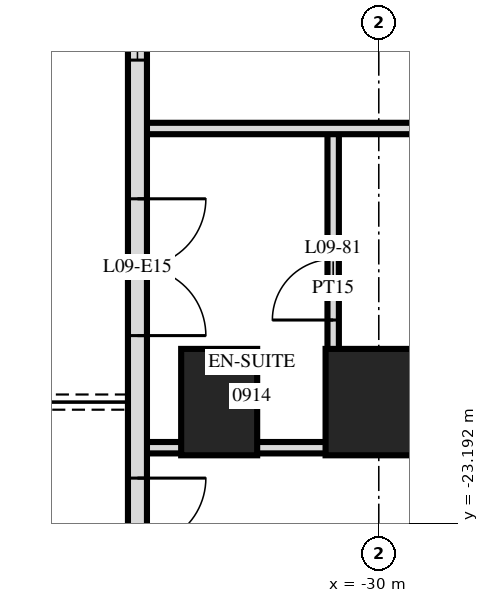
"""IFC4 building model, lengths in metres.
Left out: names, types, materials, properties, quantities, classifications, styles, units other than length and angle.
Written with IfcOpenShell. Run it as: python <this file> out.ifc"""

import sys

from ifc_helpers import new_model, si_unit, direction, frame, frame_2d, origin, origin_2d, place, context, subcontext, project, spatial, rectangle, extrude, element, fill, save


model = new_model("IFC4")
c1 = context("Model", 3, precision=1e-05, world=origin(), true_north=direction((0.0, 1.0)))
c2 = subcontext(c1, "Body", "Model", "MODEL_VIEW")
j1 = project(units=[si_unit("LENGTHUNIT", "METRE"), si_unit("PLANEANGLEUNIT", "RADIAN")], contexts=[c1])
p1 = place(None, origin())
s1 = spatial("IfcSite", under=j1, at=p1, CompositionType="ELEMENT")
p2 = place(p1, origin())
s2 = spatial("IfcBuilding", under=s1, at=p2, CompositionType="ELEMENT")
p3 = place(p2, frame((0.0, 0.0, 42.0)))
s3 = spatial("IfcBuildingStorey", under=s2, at=p3, CompositionType="ELEMENT", Elevation=42.0)
p4 = place(p3, frame((-32.1, -21.6, 0.0), z_axis=(0.0, 0.0, 1.0), x_axis=(0.0, 1.0, 0.0)))
e1 = element("IfcColumn", 1, at=p4, inside=s3, PredefinedType="COLUMN", context=c2, shape_type="SweptSolid", body=[
    extrude(rectangle(XDim=1.4, YDim=1.0, at=origin_2d()), origin(), (0.0, 0.0, 1.0), 3.6),
])
p5 = place(p3, frame((-30.0, -21.6, 0.0), z_axis=(0.0, 0.0, 1.0), x_axis=(1.0, 0.0, 0.0)))
e2 = element("IfcColumn", 2, at=p5, inside=s3, PredefinedType="COLUMN", context=c2, shape_type="SweptSolid", body=[
    extrude(rectangle(XDim=1.4, YDim=1.4, at=origin_2d()), origin(), (0.0, 0.0, 1.0), 3.6),
])
p6 = place(p3, frame((-33.175, -3.325, 0.0), z_axis=(0.0, 0.0, 1.0), x_axis=(0.0, -1.0, 0.0)))
e3 = element("IfcWall", 3, at=p6, inside=s3, PredefinedType="SOLIDWALL", context=c2, shape_type="SweptSolid", body=[
    extrude(rectangle(XDim=21.551, YDim=0.25, at=frame_2d((10.775, 0.0))), origin(), (0.0, 0.0, 1.0), 3.32),
])
p7 = place(p6, frame((6.575, 0.0, 0.0)))
e4 = element("IfcOpeningElement", 4, at=p7, cuts=e3, PredefinedType="OPENING", context=c2, shape_type="SweptSolid", body=[
    extrude(rectangle(XDim=1.8, YDim=2.4, at=frame_2d((0.9, 1.2))), frame((0.0, 0.135, 0.0), z_axis=(0.0, -1.0, 0.0), x_axis=(1.0, 0.0, 0.0)), (0.0, 0.0, 1.0), 0.27),
])
p8 = place(p6, frame((9.425, 0.0, 0.3)))
e5 = element("IfcOpeningElement", 5, at=p8, cuts=e3, PredefinedType="OPENING", context=c2, shape_type="SweptSolid", body=[
    extrude(rectangle(XDim=1.8, YDim=2.1, at=frame_2d((0.9, 1.05))), frame((0.0, 0.135, 0.0), z_axis=(0.0, -1.0, 0.0), x_axis=(1.0, 0.0, 0.0)), (0.0, 0.0, 1.0), 0.27),
])
p9 = place(p6, frame((12.575, 0.0, 0.3)))
e6 = element("IfcOpeningElement", 6, at=p9, cuts=e3, PredefinedType="OPENING", context=c2, shape_type="SweptSolid", body=[
    extrude(rectangle(XDim=1.2, YDim=2.1, at=frame_2d((0.6, 1.05))), frame((0.0, 0.135, 0.0), z_axis=(0.0, -1.0, 0.0), x_axis=(1.0, 0.0, 0.0)), (0.0, 0.0, 1.0), 0.27),
])
p10 = place(p6, frame((15.6, 0.0, 0.0)))
e7 = element("IfcOpeningElement", 7, at=p10, cuts=e3, PredefinedType="OPENING", context=c2, shape_type="SweptSolid", body=[
    extrude(rectangle(XDim=1.8, YDim=2.4, at=frame_2d((0.9, 1.2))), frame((0.0, 0.135, 0.0), z_axis=(0.0, -1.0, 0.0), x_axis=(1.0, 0.0, 0.0)), (0.0, 0.0, 1.0), 0.27),
])
p11 = place(p6, frame((19.275, 0.0, 0.0)))
e8 = element("IfcOpeningElement", 8, at=p11, cuts=e3, PredefinedType="OPENING", context=c2, shape_type="SweptSolid", body=[
    extrude(rectangle(XDim=1.8, YDim=2.4, at=frame_2d((0.9, 1.2))), frame((0.0, 0.135, 0.0), z_axis=(0.0, -1.0, 0.0), x_axis=(1.0, 0.0, 0.0)), (0.0, 0.0, 1.0), 0.27),
])
p12 = place(p3, frame((-30.6, -22.2, 0.0), z_axis=(0.0, 0.0, 1.0), x_axis=(0.0, 1.0, 0.0)))
e9 = element("IfcWall", 9, at=p12, inside=s3, PredefinedType="PARTITIONING", context=c2, shape_type="SweptSolid", body=[
    extrude(rectangle(XDim=4.2, YDim=0.15, at=frame_2d((2.1, 0.0))), origin(), (0.0, 0.0, 1.0), 3.32),
])
p13 = place(p12, frame((1.68, 0.0, 0.0)))
e10 = element("IfcOpeningElement", 10, at=p13, cuts=e9, PredefinedType="OPENING", context=c2, shape_type="SweptSolid", body=[
    extrude(rectangle(XDim=0.8, YDim=2.1, at=frame_2d((0.4, 1.05))), frame((0.0, 0.085, 0.0), z_axis=(0.0, -1.0, 0.0), x_axis=(1.0, 0.0, 0.0)), (0.0, 0.0, 1.0), 0.17),
])
p14 = place(p3, frame((-33.12, -22.2, 0.0), z_axis=(0.0, 0.0, 1.0), x_axis=(1.0, 0.0, 0.0)))
e11 = element("IfcWall", 11, at=p14, inside=s3, PredefinedType="PARTITIONING", context=c2, shape_type="SweptSolid", body=[
    extrude(rectangle(XDim=2.52, YDim=0.15, at=frame_2d((1.26, 0.0))), origin(), (0.0, 0.0, 1.0), 3.32),
])
p15 = place(p3, frame((-33.12, -18.0, 0.0), z_axis=(0.0, 0.0, 1.0), x_axis=(1.0, 0.0, 0.0)))
e12 = element("IfcWall", 12, at=p15, inside=s3, PredefinedType="PARTITIONING", context=c2, shape_type="SweptSolid", body=[
    extrude(rectangle(XDim=66.24, YDim=0.15, at=frame_2d((33.12, 0.0))), origin(), (0.0, 0.0, 1.0), 3.32),
])
p16 = place(p15, frame((12.27, 0.0, 0.0)))
e13 = element("IfcOpeningElement", 13, at=p16, cuts=e12, PredefinedType="OPENING", context=c2, shape_type="SweptSolid", body=[
    extrude(rectangle(XDim=1.0, YDim=2.1, at=frame_2d((0.5, 1.05))), frame((0.0, 0.085, 0.0), z_axis=(0.0, -1.0, 0.0), x_axis=(1.0, 0.0, 0.0)), (0.0, 0.0, 1.0), 0.17),
])
p17 = place(p15, frame((16.97, 0.0, 0.0)))
e14 = element("IfcOpeningElement", 14, at=p17, cuts=e12, PredefinedType="OPENING", context=c2, shape_type="SweptSolid", body=[
    extrude(rectangle(XDim=1.0, YDim=2.1, at=frame_2d((0.5, 1.05))), frame((0.0, 0.085, 0.0), z_axis=(0.0, -1.0, 0.0), x_axis=(1.0, 0.0, 0.0)), (0.0, 0.0, 1.0), 0.17),
])
p18 = place(p15, frame((18.27, 0.0, 0.0)))
e15 = element("IfcOpeningElement", 15, at=p18, cuts=e12, PredefinedType="OPENING", context=c2, shape_type="SweptSolid", body=[
    extrude(rectangle(XDim=1.0, YDim=2.1, at=frame_2d((0.5, 1.05))), frame((0.0, 0.085, 0.0), z_axis=(0.0, -1.0, 0.0), x_axis=(1.0, 0.0, 0.0)), (0.0, 0.0, 1.0), 0.17),
])
p19 = place(p15, frame((22.97, 0.0, 0.0)))
e16 = element("IfcOpeningElement", 16, at=p19, cuts=e12, PredefinedType="OPENING", context=c2, shape_type="SweptSolid", body=[
    extrude(rectangle(XDim=1.0, YDim=2.1, at=frame_2d((0.5, 1.05))), frame((0.0, 0.085, 0.0), z_axis=(0.0, -1.0, 0.0), x_axis=(1.0, 0.0, 0.0)), (0.0, 0.0, 1.0), 0.17),
])
p20 = place(p15, frame((24.27, 0.0, 0.0)))
e17 = element("IfcOpeningElement", 17, at=p20, cuts=e12, PredefinedType="OPENING", context=c2, shape_type="SweptSolid", body=[
    extrude(rectangle(XDim=1.0, YDim=2.1, at=frame_2d((0.5, 1.05))), frame((0.0, 0.085, 0.0), z_axis=(0.0, -1.0, 0.0), x_axis=(1.0, 0.0, 0.0)), (0.0, 0.0, 1.0), 0.17),
])
p21 = place(p15, frame((28.97, 0.0, 0.0)))
e18 = element("IfcOpeningElement", 18, at=p21, cuts=e12, PredefinedType="OPENING", context=c2, shape_type="SweptSolid", body=[
    extrude(rectangle(XDim=1.0, YDim=2.1, at=frame_2d((0.5, 1.05))), frame((0.0, 0.085, 0.0), z_axis=(0.0, -1.0, 0.0), x_axis=(1.0, 0.0, 0.0)), (0.0, 0.0, 1.0), 0.17),
])
p22 = place(p15, frame((30.27, 0.0, 0.0)))
e19 = element("IfcOpeningElement", 19, at=p22, cuts=e12, PredefinedType="OPENING", context=c2, shape_type="SweptSolid", body=[
    extrude(rectangle(XDim=1.0, YDim=2.1, at=frame_2d((0.5, 1.05))), frame((0.0, 0.085, 0.0), z_axis=(0.0, -1.0, 0.0), x_axis=(1.0, 0.0, 0.0)), (0.0, 0.0, 1.0), 0.17),
])
p23 = place(p15, frame((34.97, 0.0, 0.0)))
e20 = element("IfcOpeningElement", 20, at=p23, cuts=e12, PredefinedType="OPENING", context=c2, shape_type="SweptSolid", body=[
    extrude(rectangle(XDim=1.0, YDim=2.1, at=frame_2d((0.5, 1.05))), frame((0.0, 0.085, 0.0), z_axis=(0.0, -1.0, 0.0), x_axis=(1.0, 0.0, 0.0)), (0.0, 0.0, 1.0), 0.17),
])
p24 = place(p15, frame((37.27, 0.0, 0.0)))
e21 = element("IfcOpeningElement", 21, at=p24, cuts=e12, PredefinedType="OPENING", context=c2, shape_type="SweptSolid", body=[
    extrude(rectangle(XDim=1.0, YDim=2.1, at=frame_2d((0.5, 1.05))), frame((0.0, 0.085, 0.0), z_axis=(0.0, -1.0, 0.0), x_axis=(1.0, 0.0, 0.0)), (0.0, 0.0, 1.0), 0.17),
])
p25 = place(p15, frame((43.97, 0.0, 0.0)))
e22 = element("IfcOpeningElement", 22, at=p25, cuts=e12, PredefinedType="OPENING", context=c2, shape_type="SweptSolid", body=[
    extrude(rectangle(XDim=1.0, YDim=2.1, at=frame_2d((0.5, 1.05))), frame((0.0, 0.085, 0.0), z_axis=(0.0, -1.0, 0.0), x_axis=(1.0, 0.0, 0.0)), (0.0, 0.0, 1.0), 0.17),
])
p26 = place(p15, frame((45.27, 0.0, 0.0)))
e23 = element("IfcOpeningElement", 23, at=p26, cuts=e12, PredefinedType="OPENING", context=c2, shape_type="SweptSolid", body=[
    extrude(rectangle(XDim=1.0, YDim=2.1, at=frame_2d((0.5, 1.05))), frame((0.0, 0.085, 0.0), z_axis=(0.0, -1.0, 0.0), x_axis=(1.0, 0.0, 0.0)), (0.0, 0.0, 1.0), 0.17),
])
p27 = place(p15, frame((51.22, 0.0, 0.0)))
e24 = element("IfcOpeningElement", 24, at=p27, cuts=e12, PredefinedType="OPENING", context=c2, shape_type="SweptSolid", body=[
    extrude(rectangle(XDim=1.0, YDim=2.1, at=frame_2d((0.5, 1.05))), frame((0.0, 0.085, 0.0), z_axis=(0.0, -1.0, 0.0), x_axis=(1.0, 0.0, 0.0)), (0.0, 0.0, 1.0), 0.17),
])
p28 = place(p15, frame((54.27, 0.0, 0.0)))
e25 = element("IfcOpeningElement", 25, at=p28, cuts=e12, PredefinedType="OPENING", context=c2, shape_type="SweptSolid", body=[
    extrude(rectangle(XDim=1.0, YDim=2.1, at=frame_2d((0.5, 1.05))), frame((0.0, 0.085, 0.0), z_axis=(0.0, -1.0, 0.0), x_axis=(1.0, 0.0, 0.0)), (0.0, 0.0, 1.0), 0.17),
])
p29 = place(p15, frame((6.07, 0.0, 0.0)))
e26 = element("IfcOpeningElement", 26, at=p29, cuts=e12, PredefinedType="OPENING", context=c2, shape_type="SweptSolid", body=[
    extrude(rectangle(XDim=1.0, YDim=2.1, at=frame_2d((0.5, 1.05))), frame((0.0, 0.085, 0.0), z_axis=(0.0, -1.0, 0.0), x_axis=(1.0, 0.0, 0.0)), (0.0, 0.0, 1.0), 0.17),
])
p30 = place(p15, frame((63.37, 0.0, 0.0)))
e27 = element("IfcOpeningElement", 27, at=p30, cuts=e12, PredefinedType="OPENING", context=c2, shape_type="SweptSolid", body=[
    extrude(rectangle(XDim=1.0, YDim=2.1, at=frame_2d((0.5, 1.05))), frame((0.0, 0.085, 0.0), z_axis=(0.0, -1.0, 0.0), x_axis=(1.0, 0.0, 0.0)), (0.0, 0.0, 1.0), 0.17),
])
p31 = place(p9, origin())
e28 = element("IfcWindow", 28, at=p31, inside=s3, PartitioningType="SINGLE_PANEL", PredefinedType="WINDOW", context=c2, shape_type="SweptSolid", body=[
    extrude(rectangle(XDim=1.2, YDim=2.1, at=frame_2d((0.6, 1.05))), frame((0.0, 0.03, 0.0), z_axis=(0.0, -1.0, 0.0), x_axis=(1.0, 0.0, 0.0)), (0.0, 0.0, 1.0), 0.06),
])
fill(e6, e28)
p32 = place(p10, origin())
e29 = element("IfcDoor", 29, at=p32, inside=s3, OperationType="DOUBLE_DOOR_SINGLE_SWING", PredefinedType="DOOR", context=c2, shape_type="SweptSolid", body=[
    extrude(rectangle(XDim=1.8, YDim=2.4, at=frame_2d((0.9, 1.2))), frame((0.0, 0.025, 0.0), z_axis=(0.0, -1.0, 0.0), x_axis=(1.0, 0.0, 0.0)), (0.0, 0.0, 1.0), 0.05),
])
fill(e7, e29)
p33 = place(p11, origin())
e30 = element("IfcDoor", 30, at=p33, inside=s3, OperationType="DOUBLE_DOOR_SINGLE_SWING", PredefinedType="DOOR", context=c2, shape_type="SweptSolid", body=[
    extrude(rectangle(XDim=1.8, YDim=2.4, at=frame_2d((0.9, 1.2))), frame((0.0, 0.025, 0.0), z_axis=(0.0, -1.0, 0.0), x_axis=(1.0, 0.0, 0.0)), (0.0, 0.0, 1.0), 0.05),
])
fill(e8, e30)
p34 = place(p13, origin())
e31 = element("IfcDoor", 31, at=p34, inside=s3, OperationType="SINGLE_SWING_RIGHT", PredefinedType="DOOR", context=c2, shape_type="SweptSolid", body=[
    extrude(rectangle(XDim=0.8, YDim=2.1, at=frame_2d((0.4, 1.05))), frame((0.0, 0.025, 0.0), z_axis=(0.0, -1.0, 0.0), x_axis=(1.0, 0.0, 0.0)), (0.0, 0.0, 1.0), 0.05),
])
fill(e10, e31)
save(model, sys.argv[1])
